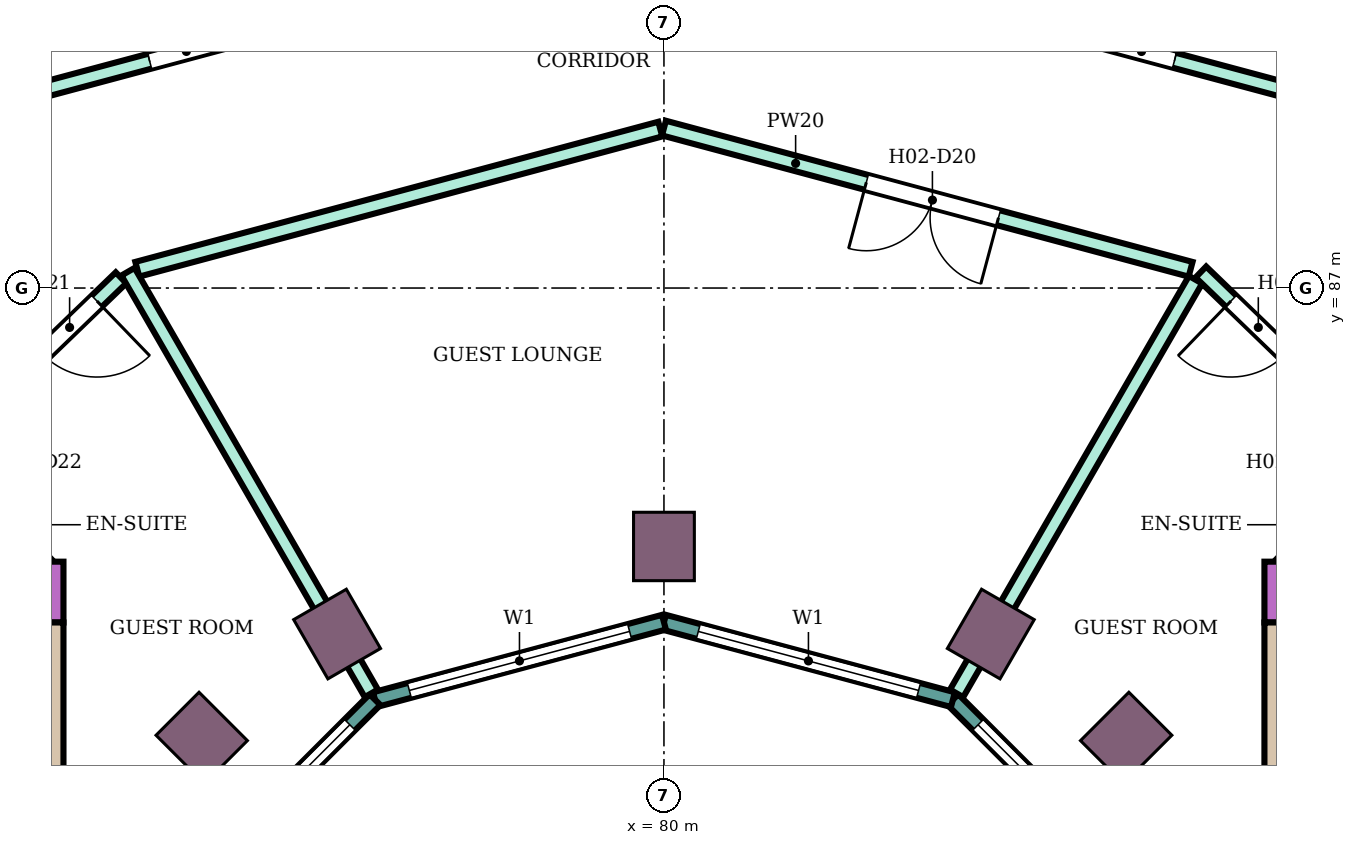
"""IFC4 building model, lengths in metres.
Left out: names, types, materials, properties, quantities, classifications, styles, units other than length and angle.
Written with IfcOpenShell. Run it as: python <this file> out.ifc"""

import sys

from ifc_helpers import new_model, si_unit, direction, frame, frame_2d, origin, origin_2d, place, context, subcontext, project, spatial, rectangle, extrude, element, fill, save


model = new_model("IFC4")
c1 = context("Model", 3, precision=1e-05, world=origin(), true_north=direction((0.0, 1.0)))
c2 = subcontext(c1, "Body", "Model", "MODEL_VIEW")
j1 = project(units=[si_unit("LENGTHUNIT", "METRE"), si_unit("PLANEANGLEUNIT", "RADIAN")], contexts=[c1])
p1 = place(None, origin())
s1 = spatial("IfcSite", under=j1, at=p1, CompositionType="ELEMENT")
p2 = place(p1, origin())
s2 = spatial("IfcBuilding", under=s1, at=p2, CompositionType="ELEMENT")
p3 = place(p2, frame((0.0, 0.0, 44.0)))
s3 = spatial("IfcBuildingStorey", under=s2, at=p3, CompositionType="ELEMENT", Elevation=44.0)
for number, where, z_axis, x_axis in (
    (1, (86.081, 81.081, 0.0), (0.0, 0.0, 1.0), (0.707, 0.707, 0.0)),
    (2, (84.3, 82.448, 0.0), (0.0, 0.0, 1.0), (0.5, 0.866, 0.0)),
    (3, (80.0, 83.6, 0.0), (0.0, 0.0, 1.0), (0.0, 1.0, 0.0)),
    (4, (75.7, 82.448, 0.0), (0.0, 0.0, 1.0), (-0.5, 0.866, 0.0)),
    (5, (73.919, 81.081, 0.0), (0.0, 0.0, 1.0), (-0.707, 0.707, 0.0)),
):
    element("IfcColumn", number, at=place(p3, frame(where, z_axis=z_axis, x_axis=x_axis)), inside=s3, PredefinedType="COLUMN", context=c2, shape_type="SweptSolid", body=[
        extrude(rectangle(XDim=0.9, YDim=0.8, at=origin_2d()), origin(), (0.0, 0.0, 1.0), 3.8),
    ])
p4 = place(p3, frame((87.9, 83.0, 0.0), z_axis=(0.0, 0.0, 1.0), x_axis=(1.0, 0.0, 0.0)))
e6 = element("IfcWall", 6, at=p4, inside=s3, PredefinedType="SHEAR", context=c2, shape_type="SweptSolid", body=[
    extrude(rectangle(XDim=14.7, YDim=0.8, at=frame_2d((7.35, 0.0))), origin(), (0.0, 0.0, 1.0), 3.48),
])
p5 = place(p4, frame((4.2, 0.0, 0.0)))
e7 = element("IfcOpeningElement", 7, at=p5, cuts=e6, PredefinedType="OPENING", context=c2, shape_type="SweptSolid", body=[
    extrude(rectangle(XDim=2.4, YDim=2.4, at=frame_2d((1.2, 1.2))), frame((0.0, 0.41, 0.0), z_axis=(0.0, -1.0, 0.0), x_axis=(1.0, 0.0, 0.0)), (0.0, 0.0, 1.0), 0.82),
])
p6 = place(p3, frame((88.125, 75.0, 0.0), z_axis=(0.0, 0.0, 1.0), x_axis=(0.0, 1.0, 0.0)))
e8 = element("IfcWall", 8, at=p6, inside=s3, PredefinedType="SHEAR", context=c2, shape_type="SweptSolid", body=[
    extrude(rectangle(XDim=7.6, YDim=0.45, at=frame_2d((3.8, 0.0))), origin(), (0.0, 0.0, 1.0), 3.48),
])
p7 = place(p3, frame((72.1, 83.0, 0.0), z_axis=(0.0, 0.0, 1.0), x_axis=(-1.0, 0.0, 0.0)))
e9 = element("IfcWall", 9, at=p7, inside=s3, PredefinedType="SHEAR", context=c2, shape_type="SweptSolid", body=[
    extrude(rectangle(XDim=14.7, YDim=0.8, at=frame_2d((7.35, 0.0))), origin(), (0.0, 0.0, 1.0), 3.48),
])
p8 = place(p7, frame((4.2, 0.0, 0.0)))
e10 = element("IfcOpeningElement", 10, at=p8, cuts=e9, PredefinedType="OPENING", context=c2, shape_type="SweptSolid", body=[
    extrude(rectangle(XDim=2.4, YDim=2.4, at=frame_2d((1.2, 1.2))), frame((0.0, 0.41, 0.0), z_axis=(0.0, -1.0, 0.0), x_axis=(1.0, 0.0, 0.0)), (0.0, 0.0, 1.0), 0.82),
])
p9 = place(p3, frame((71.875, 82.6, 0.0), z_axis=(0.0, 0.0, 1.0), x_axis=(0.0, -1.0, 0.0)))
e11 = element("IfcWall", 11, at=p9, inside=s3, PredefinedType="SHEAR", context=c2, shape_type="SweptSolid", body=[
    extrude(rectangle(XDim=7.6, YDim=0.45, at=frame_2d((3.8, 0.0))), origin(), (0.0, 0.0, 1.0), 3.48),
])
p10 = place(p3, frame((86.585, 78.802, 0.0), z_axis=(0.0, 0.0, 1.0), x_axis=(-0.707106781187, 0.707106781187, 0.0)))
e12 = element("IfcWall", 12, at=p10, inside=s3, PredefinedType="NOTDEFINED", context=c2, shape_type="SweptSolid", body=[
    extrude(rectangle(XDim=3.936, YDim=0.2, at=frame_2d((1.968, 0.0))), origin(), (0.0, 0.0, 1.0), 3.8),
])
p11 = place(p10, frame((0.468, 0.0, 0.9)))
e13 = element("IfcOpeningElement", 13, at=p11, cuts=e12, PredefinedType="OPENING", context=c2, shape_type="SweptSolid", body=[
    extrude(rectangle(XDim=3.0, YDim=2.3, at=frame_2d((1.5, 1.15))), frame((0.0, 0.11, 0.0), z_axis=(0.0, -1.0, 0.0), x_axis=(1.0, 0.0, 0.0)), (0.0, 0.0, 1.0), 0.22),
])
p12 = place(p3, frame((83.802, 81.585, 0.0), z_axis=(0.0, 0.0, 1.0), x_axis=(-0.965933654434, 0.258789828301, 0.0)))
e14 = element("IfcWall", 14, at=p12, inside=s3, PredefinedType="NOTDEFINED", context=c2, shape_type="SweptSolid", body=[
    extrude(rectangle(XDim=3.936, YDim=0.2, at=frame_2d((1.968, 0.0))), origin(), (0.0, 0.0, 1.0), 3.8),
])
p13 = place(p12, frame((0.468, 0.0, 0.9)))
e15 = element("IfcOpeningElement", 15, at=p13, cuts=e14, PredefinedType="OPENING", context=c2, shape_type="SweptSolid", body=[
    extrude(rectangle(XDim=3.0, YDim=2.3, at=frame_2d((1.5, 1.15))), frame((0.0, 0.11, 0.0), z_axis=(0.0, -1.0, 0.0), x_axis=(1.0, 0.0, 0.0)), (0.0, 0.0, 1.0), 0.22),
])
p14 = place(p3, frame((80.0, 82.604, 0.0), z_axis=(0.0, 0.0, 1.0), x_axis=(-0.965933654434, -0.258789828301, 0.0)))
e16 = element("IfcWall", 16, at=p14, inside=s3, PredefinedType="NOTDEFINED", context=c2, shape_type="SweptSolid", body=[
    extrude(rectangle(XDim=3.936, YDim=0.2, at=frame_2d((1.968, 0.0))), origin(), (0.0, 0.0, 1.0), 3.8),
])
p15 = place(p14, frame((0.468, 0.0, 0.9)))
e17 = element("IfcOpeningElement", 17, at=p15, cuts=e16, PredefinedType="OPENING", context=c2, shape_type="SweptSolid", body=[
    extrude(rectangle(XDim=3.0, YDim=2.3, at=frame_2d((1.5, 1.15))), frame((0.0, 0.11, 0.0), z_axis=(0.0, -1.0, 0.0), x_axis=(1.0, 0.0, 0.0)), (0.0, 0.0, 1.0), 0.22),
])
p16 = place(p3, frame((76.198, 81.585, 0.0), z_axis=(0.0, 0.0, 1.0), x_axis=(-0.707106781187, -0.707106781187, 0.0)))
e18 = element("IfcWall", 18, at=p16, inside=s3, PredefinedType="NOTDEFINED", context=c2, shape_type="SweptSolid", body=[
    extrude(rectangle(XDim=3.936, YDim=0.2, at=frame_2d((1.968, 0.0))), origin(), (0.0, 0.0, 1.0), 3.8),
])
p17 = place(p16, frame((0.468, 0.0, 0.9)))
e19 = element("IfcOpeningElement", 19, at=p17, cuts=e18, PredefinedType="OPENING", context=c2, shape_type="SweptSolid", body=[
    extrude(rectangle(XDim=3.0, YDim=2.3, at=frame_2d((1.5, 1.15))), frame((0.0, 0.11, 0.0), z_axis=(0.0, -1.0, 0.0), x_axis=(1.0, 0.0, 0.0)), (0.0, 0.0, 1.0), 0.22),
])
p18 = place(p3, frame((68.987, 83.4, 0.0), z_axis=(0.0, 0.0, 1.0), x_axis=(0.719591503389, 0.694397629784, 0.0)))
e20 = element("IfcWall", 20, at=p18, inside=s3, PredefinedType="PARTITIONING", context=c2, shape_type="SweptSolid", body=[
    extrude(rectangle(XDim=5.378, YDim=0.2, at=frame_2d((2.689, 0.0))), origin(), (0.0, 0.0, 1.0), 3.35),
])
p19 = place(p18, frame((3.938, 0.0, 0.0)))
e21 = element("IfcOpeningElement", 21, at=p19, cuts=e20, PredefinedType="OPENING", context=c2, shape_type="SweptSolid", body=[
    extrude(rectangle(XDim=1.0, YDim=2.1, at=frame_2d((0.5, 1.05))), frame((0.0, 0.11, 0.0), z_axis=(0.0, -1.0, 0.0), x_axis=(1.0, 0.0, 0.0)), (0.0, 0.0, 1.0), 0.22),
])
p20 = place(p3, frame((71.614, 89.55, 0.0), z_axis=(0.0, 0.0, 1.0), x_axis=(0.96597505802, 0.258635239832, 0.0)))
e22 = element("IfcWall", 22, at=p20, inside=s3, PredefinedType="PARTITIONING", context=c2, shape_type="SweptSolid", body=[
    extrude(rectangle(XDim=8.592, YDim=0.2, at=frame_2d((4.296, 0.0))), origin(), (0.0, 0.0, 1.0), 3.35),
])
p21 = place(p20, frame((4.865, 0.0, 0.0)))
e23 = element("IfcOpeningElement", 23, at=p21, cuts=e22, PredefinedType="OPENING", context=c2, shape_type="SweptSolid", body=[
    extrude(rectangle(XDim=1.0, YDim=2.1, at=frame_2d((0.5, 1.05))), frame((0.0, 0.11, 0.0), z_axis=(0.0, -1.0, 0.0), x_axis=(1.0, 0.0, 0.0)), (0.0, 0.0, 1.0), 0.22),
])
p22 = place(p20, frame((1.677, 0.0, 0.0)))
e24 = element("IfcOpeningElement", 24, at=p22, cuts=e22, PredefinedType="OPENING", context=c2, shape_type="SweptSolid", body=[
    extrude(rectangle(XDim=1.0, YDim=2.1, at=frame_2d((0.5, 1.05))), frame((0.0, 0.11, 0.0), z_axis=(0.0, -1.0, 0.0), x_axis=(1.0, 0.0, 0.0)), (0.0, 0.0, 1.0), 0.22),
])
p23 = place(p3, frame((73.071, 87.247, 0.0), z_axis=(0.0, 0.0, 1.0), x_axis=(0.965920206274, 0.258840018373, 0.0)))
e25 = element("IfcWall", 25, at=p23, inside=s3, PredefinedType="PARTITIONING", context=c2, shape_type="SweptSolid", body=[
    extrude(rectangle(XDim=7.123, YDim=0.2, at=frame_2d((3.562, 0.0))), origin(), (0.0, 0.0, 1.0), 3.35),
])
p24 = place(p3, frame((72.949, 87.215, 0.0), z_axis=(0.0, 0.0, 1.0), x_axis=(0.499890755261, -0.866088467077, 0.0)))
e26 = element("IfcWall", 26, at=p24, inside=s3, PredefinedType="PARTITIONING", context=c2, shape_type="SweptSolid", body=[
    extrude(rectangle(XDim=6.404, YDim=0.2, at=frame_2d((3.202, 0.0))), origin(), (0.0, 0.0, 1.0), 3.35),
])
p25 = place(p3, frame((80.0, 89.104, 0.0), z_axis=(0.0, 0.0, 1.0), x_axis=(0.965886659739, -0.258965172444, 0.0)))
e27 = element("IfcWall", 27, at=p25, inside=s3, PredefinedType="PARTITIONING", context=c2, shape_type="SweptSolid", body=[
    extrude(rectangle(XDim=7.173, YDim=0.2, at=frame_2d((3.587, 0.0))), origin(), (0.0, 0.0, 1.0), 3.35),
])
p26 = place(p25, frame((2.757, 0.0, 0.0)))
e28 = element("IfcOpeningElement", 28, at=p26, cuts=e27, PredefinedType="OPENING", context=c2, shape_type="SweptSolid", body=[
    extrude(rectangle(XDim=1.8, YDim=2.1, at=frame_2d((0.9, 1.05))), frame((0.0, 0.11, 0.0), z_axis=(0.0, -1.0, 0.0), x_axis=(1.0, 0.0, 0.0)), (0.0, 0.0, 1.0), 0.22),
])
p27 = place(p3, frame((80.0, 91.796, 0.0), z_axis=(0.0, 0.0, 1.0), x_axis=(0.965896351823, -0.258929020266, 0.0)))
e29 = element("IfcWall", 29, at=p27, inside=s3, PredefinedType="PARTITIONING", context=c2, shape_type="SweptSolid", body=[
    extrude(rectangle(XDim=8.602, YDim=0.2, at=frame_2d((4.301, 0.0))), origin(), (0.0, 0.0, 1.0), 3.35),
])
p28 = place(p27, frame((6.055, 0.0, 0.0)))
e30 = element("IfcOpeningElement", 30, at=p28, cuts=e29, PredefinedType="OPENING", context=c2, shape_type="SweptSolid", body=[
    extrude(rectangle(XDim=0.9, YDim=2.1, at=frame_2d((0.45, 1.05))), frame((0.0, 0.11, 0.0), z_axis=(0.0, -1.0, 0.0), x_axis=(1.0, 0.0, 0.0)), (0.0, 0.0, 1.0), 0.22),
])
p29 = place(p27, frame((2.817, 0.0, 0.0)))
e31 = element("IfcOpeningElement", 31, at=p29, cuts=e29, PredefinedType="OPENING", context=c2, shape_type="SweptSolid", body=[
    extrude(rectangle(XDim=1.0, YDim=2.1, at=frame_2d((0.5, 1.05))), frame((0.0, 0.11, 0.0), z_axis=(0.0, -1.0, 0.0), x_axis=(1.0, 0.0, 0.0)), (0.0, 0.0, 1.0), 0.22),
])
p30 = place(p3, frame((83.85, 81.668, 0.0), z_axis=(0.0, 0.0, 1.0), x_axis=(0.500233583443, 0.865890502313, 0.0)))
e32 = element("IfcWall", 32, at=p30, inside=s3, PredefinedType="PARTITIONING", context=c2, shape_type="SweptSolid", body=[
    extrude(rectangle(XDim=6.284, YDim=0.2, at=frame_2d((3.142, 0.0))), origin(), (0.0, 0.0, 1.0), 3.35),
])
p31 = place(p3, frame((87.064, 87.211, 0.0), z_axis=(0.0, 0.0, 1.0), x_axis=(0.719540958932, -0.694450004262, 0.0)))
e33 = element("IfcWall", 33, at=p31, inside=s3, PredefinedType="PARTITIONING", context=c2, shape_type="SweptSolid", body=[
    extrude(rectangle(XDim=5.488, YDim=0.2, at=frame_2d((2.744, 0.0))), origin(), (0.0, 0.0, 1.0), 3.35),
])
p32 = place(p31, frame((0.55, 0.0, 0.0)))
e34 = element("IfcOpeningElement", 34, at=p32, cuts=e33, PredefinedType="OPENING", context=c2, shape_type="SweptSolid", body=[
    extrude(rectangle(XDim=1.0, YDim=2.1, at=frame_2d((0.5, 1.05))), frame((0.0, 0.11, 0.0), z_axis=(0.0, -1.0, 0.0), x_axis=(1.0, 0.0, 0.0)), (0.0, 0.0, 1.0), 0.22),
])
p33 = place(p11, origin())
e35 = element("IfcWindow", 35, at=p33, inside=s3, PartitioningType="SINGLE_PANEL", PredefinedType="WINDOW", context=c2, shape_type="SweptSolid", body=[
    extrude(rectangle(XDim=3.0, YDim=2.3, at=frame_2d((1.5, 1.15))), frame((0.0, 0.03, 0.0), z_axis=(0.0, -1.0, 0.0), x_axis=(1.0, 0.0, 0.0)), (0.0, 0.0, 1.0), 0.06),
])
fill(e13, e35)
p34 = place(p13, origin())
e36 = element("IfcWindow", 36, at=p34, inside=s3, PartitioningType="SINGLE_PANEL", PredefinedType="WINDOW", context=c2, shape_type="SweptSolid", body=[
    extrude(rectangle(XDim=3.0, YDim=2.3, at=frame_2d((1.5, 1.15))), frame((0.0, 0.03, 0.0), z_axis=(0.0, -1.0, 0.0), x_axis=(1.0, 0.0, 0.0)), (0.0, 0.0, 1.0), 0.06),
])
fill(e15, e36)
p35 = place(p15, origin())
e37 = element("IfcWindow", 37, at=p35, inside=s3, PartitioningType="SINGLE_PANEL", PredefinedType="WINDOW", context=c2, shape_type="SweptSolid", body=[
    extrude(rectangle(XDim=3.0, YDim=2.3, at=frame_2d((1.5, 1.15))), frame((0.0, 0.03, 0.0), z_axis=(0.0, -1.0, 0.0), x_axis=(1.0, 0.0, 0.0)), (0.0, 0.0, 1.0), 0.06),
])
fill(e17, e37)
p36 = place(p17, origin())
e38 = element("IfcWindow", 38, at=p36, inside=s3, PartitioningType="SINGLE_PANEL", PredefinedType="WINDOW", context=c2, shape_type="SweptSolid", body=[
    extrude(rectangle(XDim=3.0, YDim=2.3, at=frame_2d((1.5, 1.15))), frame((0.0, 0.03, 0.0), z_axis=(0.0, -1.0, 0.0), x_axis=(1.0, 0.0, 0.0)), (0.0, 0.0, 1.0), 0.06),
])
fill(e19, e38)
p37 = place(p28, origin())
e39 = element("IfcDoor", 39, at=p37, inside=s3, OperationType="SINGLE_SWING_LEFT", PredefinedType="DOOR", context=c2, shape_type="SweptSolid", body=[
    extrude(rectangle(XDim=0.9, YDim=2.1, at=frame_2d((0.45, 1.05))), frame((0.0, 0.025, 0.0), z_axis=(0.0, -1.0, 0.0), x_axis=(1.0, 0.0, 0.0)), (0.0, 0.0, 1.0), 0.05),
])
fill(e30, e39)
p38 = place(p22, origin())
e40 = element("IfcDoor", 40, at=p38, inside=s3, OperationType="SINGLE_SWING_RIGHT", PredefinedType="DOOR", context=c2, shape_type="SweptSolid", body=[
    extrude(rectangle(XDim=1.0, YDim=2.1, at=frame_2d((0.5, 1.05))), frame((0.0, 0.025, 0.0), z_axis=(0.0, -1.0, 0.0), x_axis=(1.0, 0.0, 0.0)), (0.0, 0.0, 1.0), 0.05),
])
fill(e24, e40)
p39 = place(p32, frame((1.0, 0.0, 0.0), z_axis=(0.0, 0.0, 1.0), x_axis=(-1.0, 0.0, 0.0)))
e41 = element("IfcDoor", 41, at=p39, inside=s3, OperationType="SINGLE_SWING_RIGHT", PredefinedType="DOOR", context=c2, shape_type="SweptSolid", body=[
    extrude(rectangle(XDim=1.0, YDim=2.1, at=frame_2d((0.5, 1.05))), frame((0.0, 0.025, 0.0), z_axis=(0.0, -1.0, 0.0), x_axis=(1.0, 0.0, 0.0)), (0.0, 0.0, 1.0), 0.05),
])
fill(e34, e41)
p40 = place(p26, frame((1.8, 0.0, 0.0), z_axis=(0.0, 0.0, 1.0), x_axis=(-1.0, 0.0, 0.0)))
e42 = element("IfcDoor", 42, at=p40, inside=s3, OperationType="DOUBLE_DOOR_SINGLE_SWING", PredefinedType="DOOR", context=c2, shape_type="SweptSolid", body=[
    extrude(rectangle(XDim=1.8, YDim=2.1, at=frame_2d((0.9, 1.05))), frame((0.0, 0.025, 0.0), z_axis=(0.0, -1.0, 0.0), x_axis=(1.0, 0.0, 0.0)), (0.0, 0.0, 1.0), 0.05),
])
fill(e28, e42)
p41 = place(p19, frame((1.0, 0.0, 0.0), z_axis=(0.0, 0.0, 1.0), x_axis=(-1.0, 0.0, 0.0)))
e43 = element("IfcDoor", 43, at=p41, inside=s3, OperationType="SINGLE_SWING_LEFT", PredefinedType="DOOR", context=c2, shape_type="SweptSolid", body=[
    extrude(rectangle(XDim=1.0, YDim=2.1, at=frame_2d((0.5, 1.05))), frame((0.0, 0.025, 0.0), z_axis=(0.0, -1.0, 0.0), x_axis=(1.0, 0.0, 0.0)), (0.0, 0.0, 1.0), 0.05),
])
fill(e21, e43)
save(model, sys.argv[1])
